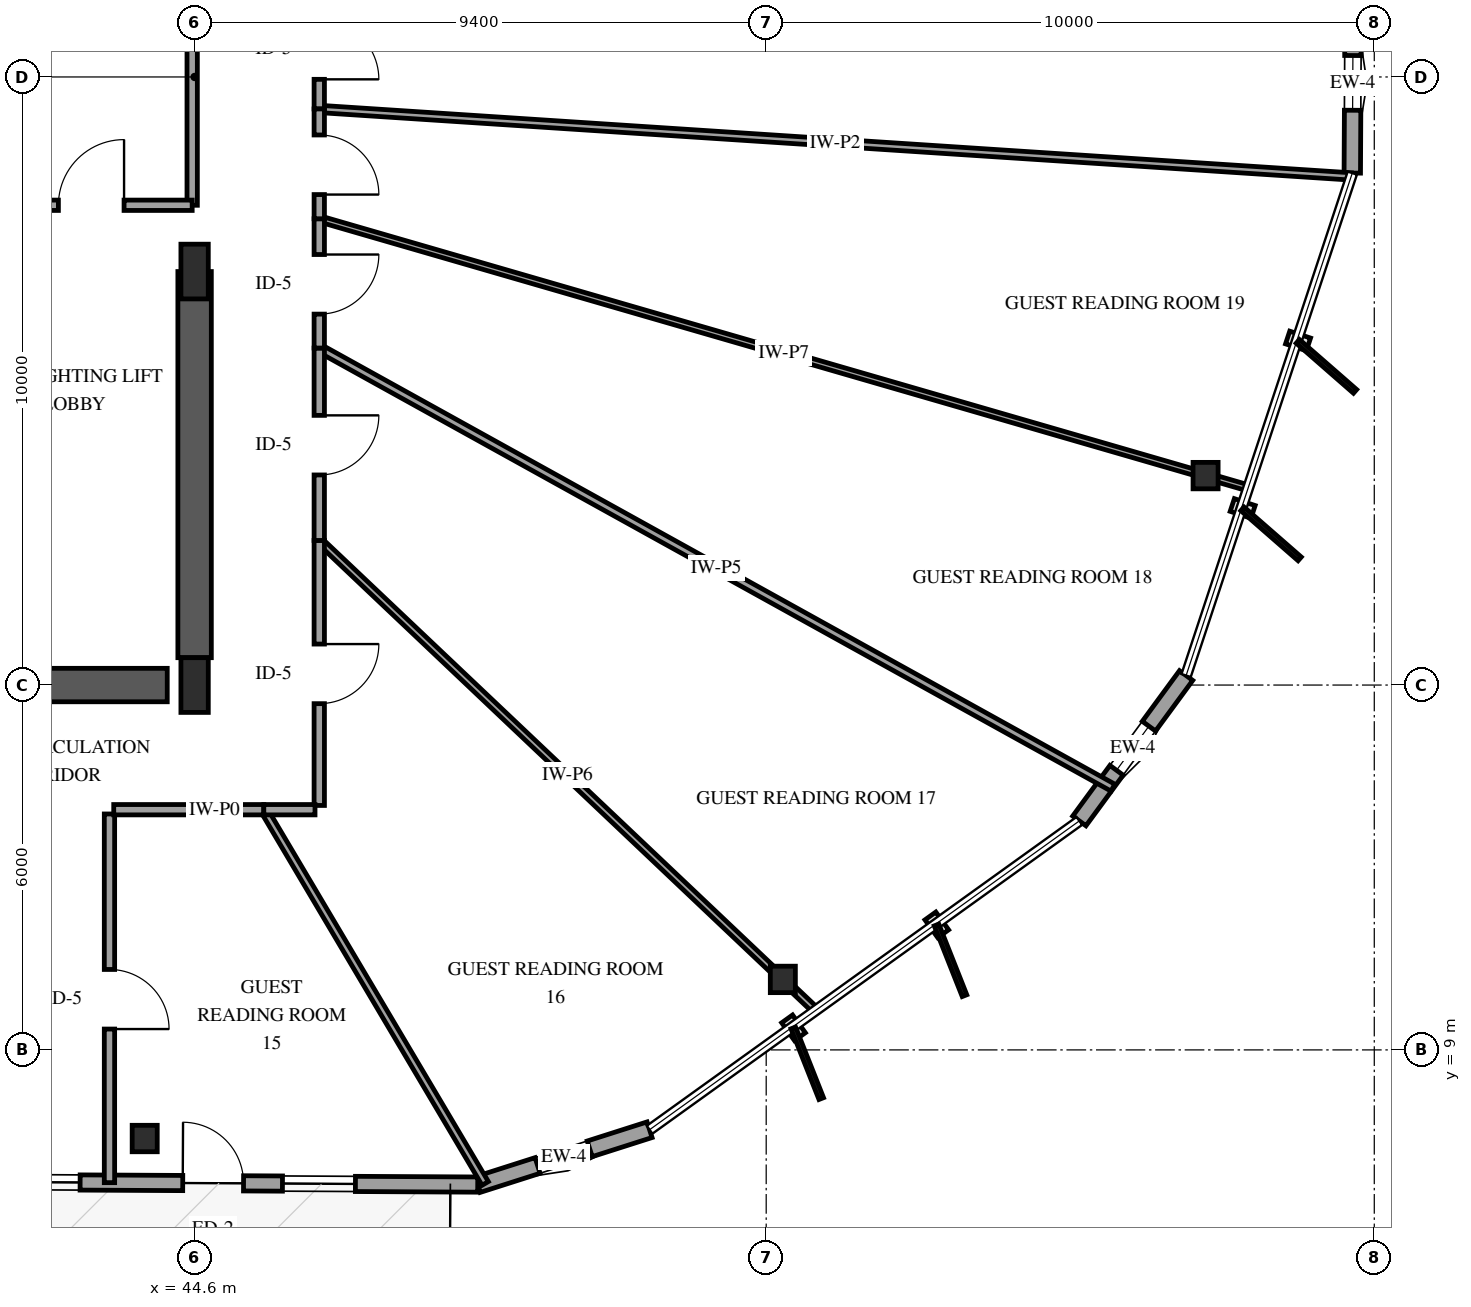
"""IFC4 building model, lengths in metres.
Left out: names, types, materials, properties, quantities, classifications, styles, units other than length and angle.
Written with IfcOpenShell. Run it as: python <this file> out.ifc"""

import sys

from ifc_helpers import new_model, si_unit, direction, frame, frame_2d, origin, origin_2d, place, context, subcontext, project, spatial, rectangle, i_section, extrude, element, fill, save


model = new_model("IFC4")
c1 = context("Model", 3, precision=1e-05, world=origin(), true_north=direction((0.0, 1.0)))
c2 = subcontext(c1, "Body", "Model", "MODEL_VIEW")
j1 = project(units=[si_unit("LENGTHUNIT", "METRE"), si_unit("PLANEANGLEUNIT", "RADIAN")], contexts=[c1])
p1 = place(None, origin())
s1 = spatial("IfcSite", under=j1, at=p1, CompositionType="ELEMENT")
p2 = place(p1, origin())
s2 = spatial("IfcBuilding", under=s1, at=p2, CompositionType="ELEMENT")
p3 = place(p2, frame((0.0, 0.0, 164.2)))
s3 = spatial("IfcBuildingStorey", under=s2, at=p3, CompositionType="ELEMENT", Elevation=164.2)
p4 = place(p3, frame((41.3, 15.0, 0.0), z_axis=(0.0, 0.0, 1.0), x_axis=(1.0, 0.0, 0.0)))
e1 = element("IfcWall", 1, at=p4, inside=s3, PredefinedType="SHEAR", context=c2, shape_type="SweptSolid", body=[
    extrude(rectangle(XDim=2.85, YDim=0.55, at=frame_2d((1.425, 0.0))), origin(), (0.0, 0.0, 1.0), 3.6),
])
p5 = place(p3, frame((44.6, 15.45, 0.0), z_axis=(0.0, 0.0, 1.0), x_axis=(0.0, 1.0, 0.0)))
e2 = element("IfcWall", 2, at=p5, inside=s3, PredefinedType="SHEAR", context=c2, shape_type="SweptSolid", body=[
    extrude(rectangle(XDim=6.35, YDim=0.55, at=frame_2d((3.175, 0.0))), origin(), (0.0, 0.0, 1.0), 3.6),
])
for number, where, z_axis, x_axis in (
    (3, (44.6, 15.0, 0.0), (0.0, 0.0, 1.0), (1.0, 0.0, 0.0)),
    (4, (44.6, 21.8, 0.0), (0.0, 0.0, 1.0), (1.0, 0.0, 0.0)),
):
    element("IfcColumn", number, at=place(p3, frame(where, z_axis=z_axis, x_axis=x_axis)), inside=s3, PredefinedType="PILASTER", context=c2, shape_type="SweptSolid", body=[
        extrude(rectangle(XDim=0.45, YDim=0.9, at=origin_2d()), origin(), (0.0, 0.0, 1.0), 3.6),
    ])
for number, where, z_axis, x_axis in (
    (5, (43.779, 7.542, 0.0), (0.0, 0.0, 1.0), (1.0, 0.0, 0.0)),
    (6, (54.274, 10.159, 0.0), (0.0, 0.0, 1.0), (1.0, 0.0, 0.0)),
    (7, (61.226, 18.444, 0.0), (0.0, 0.0, 1.0), (1.0, 0.0, 0.0)),
):
    element("IfcColumn", number, at=place(p3, frame(where, z_axis=z_axis, x_axis=x_axis)), inside=s3, PredefinedType="COLUMN", context=c2, shape_type="SweptSolid", body=[
        extrude(i_section(OverallWidth=0.412, OverallDepth=0.435, WebThickness=0.036, FlangeThickness=0.057, FilletRadius=0.038, at=origin_2d()), origin(), (0.0, 0.0, 1.0), 3.6),
    ])
p6 = place(p3, frame((49.256, 6.785, 0.0), z_axis=(0.0, 0.0, 1.0), x_axis=(0.95267036835, 0.304005212568, 0.0)))
e8 = element("IfcWall", 8, at=p6, inside=s3, PredefinedType="SOLIDWALL", context=c2, shape_type="SweptSolid", body=[
    extrude(rectangle(XDim=2.967, YDim=0.27, at=frame_2d((1.483, 0.0))), origin(), (0.0, 0.0, 1.0), 2.679),
])
p7 = place(p6, frame((1.033, 0.0, 0.75)))
e9 = element("IfcOpeningElement", 9, at=p7, cuts=e8, PredefinedType="OPENING", context=c2, shape_type="SweptSolid", body=[
    extrude(rectangle(XDim=0.9, YDim=1.5, at=frame_2d((0.45, 0.75))), frame((0.0, 0.145, 0.0), z_axis=(0.0, -1.0, 0.0), x_axis=(1.0, 0.0, 0.0)), (0.0, 0.0, 1.0), 0.29),
])
p8 = place(p3, frame((40.553, 6.831, 0.0), z_axis=(0.0, 0.0, 1.0), x_axis=(0.999986386637, -0.005217905737, 0.0)))
e10 = element("IfcWall", 10, at=p8, inside=s3, PredefinedType="SOLIDWALL", context=c2, shape_type="SweptSolid", body=[
    extrude(rectangle(XDim=8.703, YDim=0.25, at=frame_2d((4.351, 0.0))), origin(), (0.0, 0.0, 1.0), 2.679),
])
p9 = place(p8, frame((3.851, 0.0, 0.0)))
e11 = element("IfcOpeningElement", 11, at=p9, cuts=e10, PredefinedType="OPENING", context=c2, shape_type="SweptSolid", body=[
    extrude(rectangle(XDim=1.0, YDim=2.15, at=frame_2d((0.5, 1.075))), frame((0.0, 0.135, 0.0), z_axis=(0.0, -1.0, 0.0), x_axis=(1.0, 0.0, 0.0)), (0.0, 0.0, 1.0), 0.27),
])
p10 = place(p8, frame((0.964, 0.0, 0.72)))
e12 = element("IfcOpeningElement", 12, at=p10, cuts=e10, PredefinedType="OPENING", context=c2, shape_type="SweptSolid", body=[
    extrude(rectangle(XDim=1.2, YDim=1.6, at=frame_2d((0.6, 0.8))), frame((0.0, 0.135, 0.0), z_axis=(0.0, -1.0, 0.0), x_axis=(1.0, 0.0, 0.0)), (0.0, 0.0, 1.0), 0.27),
])
p11 = place(p8, frame((5.491, 0.0, 0.72)))
e13 = element("IfcOpeningElement", 13, at=p11, cuts=e10, PredefinedType="OPENING", context=c2, shape_type="SweptSolid", body=[
    extrude(rectangle(XDim=1.2, YDim=1.6, at=frame_2d((0.6, 0.8))), frame((0.0, 0.135, 0.0), z_axis=(0.0, -1.0, 0.0), x_axis=(1.0, 0.0, 0.0)), (0.0, 0.0, 1.0), 0.27),
])
p12 = place(p3, frame((59.149, 12.766, 0.0), z_axis=(0.0, 0.0, 1.0), x_axis=(0.592030622016, 0.805915468641, 0.0)))
e14 = element("IfcWall", 14, at=p12, inside=s3, PredefinedType="SOLIDWALL", context=c2, shape_type="SweptSolid", body=[
    extrude(rectangle(XDim=2.967, YDim=0.27, at=frame_2d((1.483, 0.0))), origin(), (0.0, 0.0, 1.0), 2.679),
])
p13 = place(p12, frame((1.033, 0.0, 0.75)))
e15 = element("IfcOpeningElement", 15, at=p13, cuts=e14, PredefinedType="OPENING", context=c2, shape_type="SweptSolid", body=[
    extrude(rectangle(XDim=0.9, YDim=1.5, at=frame_2d((0.45, 0.75))), frame((0.0, 0.145, 0.0), z_axis=(0.0, -1.0, 0.0), x_axis=(1.0, 0.0, 0.0)), (0.0, 0.0, 1.0), 0.29),
])
p14 = place(p3, frame((63.638, 23.419, 0.0), z_axis=(0.0, 0.0, 1.0), x_axis=(0.005267416636, 0.999986127065, 0.0)))
e16 = element("IfcWall", 16, at=p14, inside=s3, PredefinedType="SOLIDWALL", context=c2, shape_type="SweptSolid", body=[
    extrude(rectangle(XDim=2.966, YDim=0.27, at=frame_2d((1.483, 0.0))), origin(), (0.0, 0.0, 1.0), 2.679),
])
p15 = place(p14, frame((1.033, 0.0, 0.75)))
e17 = element("IfcOpeningElement", 17, at=p15, cuts=e16, PredefinedType="OPENING", context=c2, shape_type="SweptSolid", body=[
    extrude(rectangle(XDim=0.9, YDim=1.5, at=frame_2d((0.45, 0.75))), frame((0.0, 0.145, 0.0), z_axis=(0.0, -1.0, 0.0), x_axis=(1.0, 0.0, 0.0)), (0.0, 0.0, 1.0), 0.29),
])
p16 = place(p3, frame((63.62, 23.364, 0.0), z_axis=(0.0, 0.0, 1.0), x_axis=(-0.997867277943, 0.065275536078, 0.0)))
e18 = element("IfcWall", 18, at=p16, inside=s3, PredefinedType="PARTITIONING", context=c2, shape_type="SweptSolid", body=[
    extrude(rectangle(XDim=17.007, YDim=0.12, at=frame_2d((8.503, 0.0))), origin(), (0.0, 0.0, 1.0), 3.3),
])
p17 = place(p3, frame((46.65, 22.668, 0.0), z_axis=(0.0, 0.0, 1.0), x_axis=(0.960497233725, -0.278289532694, 0.0)))
e19 = element("IfcWall", 19, at=p17, inside=s3, PredefinedType="PARTITIONING", context=c2, shape_type="SweptSolid", body=[
    extrude(rectangle(XDim=15.904, YDim=0.1, at=frame_2d((7.952, 0.0))), origin(), (0.0, 0.0, 1.0), 3.3),
])
p18 = place(p3, frame((46.65, 20.542, 0.0), z_axis=(0.0, 0.0, 1.0), x_axis=(0.874785594424, -0.484510230839, 0.0)))
e20 = element("IfcWall", 20, at=p18, inside=s3, PredefinedType="PARTITIONING", context=c2, shape_type="SweptSolid", body=[
    extrude(rectangle(XDim=14.92, YDim=0.13, at=frame_2d((7.46, 0.0))), origin(), (0.0, 0.0, 1.0), 3.3),
])
p19 = place(p3, frame((46.65, 17.378, 0.0), z_axis=(0.0, 0.0, 1.0), x_axis=(0.726109041818, -0.687579565861, 0.0)))
e21 = element("IfcWall", 21, at=p19, inside=s3, PredefinedType="PARTITIONING", context=c2, shape_type="SweptSolid", body=[
    extrude(rectangle(XDim=11.241, YDim=0.11, at=frame_2d((5.621, 0.0))), origin(), (0.0, 0.0, 1.0), 2.595),
])
p20 = place(p3, frame((45.738, 12.95, 0.0), z_axis=(0.0, 0.0, 1.0), x_axis=(0.509677787301, -0.860365360258, 0.0)))
e22 = element("IfcWall", 22, at=p20, inside=s3, PredefinedType="PARTITIONING", context=c2, shape_type="SweptSolid", body=[
    extrude(rectangle(XDim=7.144, YDim=0.12, at=frame_2d((3.572, 0.0))), origin(), (0.0, 0.0, 1.0), 2.678),
])
p21 = place(p3, frame((44.56, 29.8, 0.0), z_axis=(0.0, 0.0, 1.0), x_axis=(0.0, -1.0, 0.0)))
e23 = element("IfcWall", 23, at=p21, inside=s3, PredefinedType="PARTITIONING", context=c2, shape_type="SweptSolid", body=[
    extrude(rectangle(XDim=6.91, YDim=0.17, at=frame_2d((3.455, 0.0))), origin(), (0.0, 0.0, 1.0), 2.34),
])
p22 = place(p21, frame((2.915, 0.0, 0.0)))
e24 = element("IfcOpeningElement", 24, at=p22, cuts=e23, PredefinedType="OPENING", context=c2, shape_type="SweptSolid", body=[
    extrude(rectangle(XDim=1.08, YDim=2.15, at=frame_2d((0.54, 1.075))), frame((0.0, 0.095, 0.0), z_axis=(0.0, -1.0, 0.0), x_axis=(1.0, 0.0, 0.0)), (0.0, 0.0, 1.0), 0.19),
])
p23 = place(p3, frame((43.2, 12.88, 0.0), z_axis=(0.0, 0.0, 1.0), x_axis=(0.0, -1.0, 0.0)))
e25 = element("IfcWall", 25, at=p23, inside=s3, PredefinedType="PARTITIONING", context=c2, shape_type="SweptSolid", body=[
    extrude(rectangle(XDim=6.063, YDim=0.17, at=frame_2d((3.031, 0.0))), origin(), (0.0, 0.0, 1.0), 2.595),
])
p24 = place(p23, frame((2.557, 0.0, 0.0)))
e26 = element("IfcOpeningElement", 26, at=p24, cuts=e25, PredefinedType="OPENING", context=c2, shape_type="SweptSolid", body=[
    extrude(rectangle(XDim=0.98, YDim=2.15, at=frame_2d((0.49, 1.075))), frame((0.0, 0.095, 0.0), z_axis=(0.0, -1.0, 0.0), x_axis=(1.0, 0.0, 0.0)), (0.0, 0.0, 1.0), 0.19),
])
p25 = place(p3, frame((46.65, 17.378, 0.0), z_axis=(0.0, 0.0, 1.0), x_axis=(0.0, -1.0, 0.0)))
e27 = element("IfcWall", 27, at=p25, inside=s3, PredefinedType="PARTITIONING", context=c2, shape_type="SweptSolid", body=[
    extrude(rectangle(XDim=4.358, YDim=0.17, at=frame_2d((2.179, 0.0))), origin(), (0.0, 0.0, 1.0), 3.3),
])
p26 = place(p25, frame((1.704, 0.0, 0.0)))
e28 = element("IfcOpeningElement", 28, at=p26, cuts=e27, PredefinedType="OPENING", context=c2, shape_type="SweptSolid", body=[
    extrude(rectangle(XDim=0.98, YDim=2.15, at=frame_2d((0.49, 1.075))), frame((0.0, 0.095, 0.0), z_axis=(0.0, -1.0, 0.0), x_axis=(1.0, 0.0, 0.0)), (0.0, 0.0, 1.0), 0.19),
])
p27 = place(p3, frame((41.24, 22.89, 0.0), z_axis=(0.0, 0.0, 1.0), x_axis=(1.0, 0.0, 0.0)))
e29 = element("IfcWall", 29, at=p27, inside=s3, PredefinedType="PARTITIONING", context=c2, shape_type="SweptSolid", body=[
    extrude(rectangle(XDim=3.32, YDim=0.17, at=frame_2d((1.66, 0.0))), origin(), (0.0, 0.0, 1.0), 3.3),
])
p28 = place(p27, frame((1.12, 0.0, 0.0)))
e30 = element("IfcOpeningElement", 30, at=p28, cuts=e29, PredefinedType="OPENING", context=c2, shape_type="SweptSolid", body=[
    extrude(rectangle(XDim=1.08, YDim=2.15, at=frame_2d((0.54, 1.075))), frame((0.0, 0.095, 0.0), z_axis=(0.0, -1.0, 0.0), x_axis=(1.0, 0.0, 0.0)), (0.0, 0.0, 1.0), 0.19),
])
p29 = place(p3, frame((46.65, 20.542, 0.0), z_axis=(0.0, 0.0, 1.0), x_axis=(0.0, -1.0, 0.0)))
e31 = element("IfcWall", 31, at=p29, inside=s3, PredefinedType="PARTITIONING", context=c2, shape_type="SweptSolid", body=[
    extrude(rectangle(XDim=3.164, YDim=0.17, at=frame_2d((1.582, 0.0))), origin(), (0.0, 0.0, 1.0), 3.3),
])
p30 = place(p29, frame((1.107, 0.0, 0.0)))
e32 = element("IfcOpeningElement", 32, at=p30, cuts=e31, PredefinedType="OPENING", context=c2, shape_type="SweptSolid", body=[
    extrude(rectangle(XDim=0.98, YDim=2.15, at=frame_2d((0.49, 1.075))), frame((0.0, 0.095, 0.0), z_axis=(0.0, -1.0, 0.0), x_axis=(1.0, 0.0, 0.0)), (0.0, 0.0, 1.0), 0.19),
])
p31 = place(p3, frame((45.738, 12.95, 0.0), z_axis=(0.0, 0.0, 1.0), x_axis=(-1.0, 0.0, 0.0)))
e33 = element("IfcWall", 33, at=p31, inside=s3, PredefinedType="PARTITIONING", context=c2, shape_type="SweptSolid", body=[
    extrude(rectangle(XDim=2.468, YDim=0.17, at=frame_2d((1.234, 0.0))), origin(), (0.0, 0.0, 1.0), 3.3),
])
p32 = place(p3, frame((46.65, 22.668, 0.0), z_axis=(0.0, 0.0, 1.0), x_axis=(0.0, -1.0, 0.0)))
e34 = element("IfcWall", 34, at=p32, inside=s3, PredefinedType="PARTITIONING", context=c2, shape_type="SweptSolid", body=[
    extrude(rectangle(XDim=2.126, YDim=0.17, at=frame_2d((1.063, 0.0))), origin(), (0.0, 0.0, 1.0), 3.3),
])
p33 = place(p32, frame((0.588, 0.0, 0.0)))
e35 = element("IfcOpeningElement", 35, at=p33, cuts=e34, PredefinedType="OPENING", context=c2, shape_type="SweptSolid", body=[
    extrude(rectangle(XDim=0.98, YDim=2.15, at=frame_2d((0.49, 1.075))), frame((0.0, 0.095, 0.0), z_axis=(0.0, -1.0, 0.0), x_axis=(1.0, 0.0, 0.0)), (0.0, 0.0, 1.0), 0.19),
])
p34 = place(p3, frame((46.65, 26.458, 0.0), z_axis=(0.0, 0.0, 1.0), x_axis=(0.0, -1.0, 0.0)))
e36 = element("IfcWall", 36, at=p34, inside=s3, PredefinedType="PARTITIONING", context=c2, shape_type="SweptSolid", body=[
    extrude(rectangle(XDim=1.984, YDim=0.17, at=frame_2d((0.992, 0.0))), origin(), (0.0, 0.0, 1.0), 3.3),
])
p35 = place(p34, frame((0.517, 0.0, 0.0)))
e37 = element("IfcOpeningElement", 37, at=p35, cuts=e36, PredefinedType="OPENING", context=c2, shape_type="SweptSolid", body=[
    extrude(rectangle(XDim=0.98, YDim=2.15, at=frame_2d((0.49, 1.075))), frame((0.0, 0.095, 0.0), z_axis=(0.0, -1.0, 0.0), x_axis=(1.0, 0.0, 0.0)), (0.0, 0.0, 1.0), 0.19),
])
p36 = place(p3, frame((46.65, 24.474, 0.0), z_axis=(0.0, 0.0, 1.0), x_axis=(0.0, -1.0, 0.0)))
e38 = element("IfcWall", 38, at=p36, inside=s3, PredefinedType="PARTITIONING", context=c2, shape_type="SweptSolid", body=[
    extrude(rectangle(XDim=1.806, YDim=0.17, at=frame_2d((0.903, 0.0))), origin(), (0.0, 0.0, 1.0), 3.3),
])
p37 = place(p36, frame((0.428, 0.0, 0.0)))
e39 = element("IfcOpeningElement", 39, at=p37, cuts=e38, PredefinedType="OPENING", context=c2, shape_type="SweptSolid", body=[
    extrude(rectangle(XDim=0.98, YDim=2.15, at=frame_2d((0.49, 1.075))), frame((0.0, 0.095, 0.0), z_axis=(0.0, -1.0, 0.0), x_axis=(1.0, 0.0, 0.0)), (0.0, 0.0, 1.0), 0.19),
])
p38 = place(p3, frame((46.58, 12.95, 0.0), z_axis=(0.0, 0.0, 1.0), x_axis=(-1.0, 0.0, 0.0)))
e40 = element("IfcWall", 40, at=p38, inside=s3, PredefinedType="PARTITIONING", context=c2, shape_type="SweptSolid", body=[
    extrude(rectangle(XDim=0.842, YDim=0.17, at=frame_2d((0.421, 0.0))), origin(), (0.0, 0.0, 1.0), 3.3),
])
p39 = place(p7, origin())
e41 = element("IfcWindow", 41, at=p39, inside=s3, PartitioningType="SINGLE_PANEL", PredefinedType="WINDOW", context=c2, shape_type="SweptSolid", body=[
    extrude(rectangle(XDim=0.9, YDim=1.5, at=frame_2d((0.45, 0.75))), frame((0.0, 0.03, 0.0), z_axis=(0.0, -1.0, 0.0), x_axis=(1.0, 0.0, 0.0)), (0.0, 0.0, 1.0), 0.06),
])
fill(e9, e41)
p40 = place(p9, origin())
e42 = element("IfcDoor", 42, at=p40, inside=s3, OperationType="SINGLE_SWING_LEFT", PredefinedType="DOOR", context=c2, shape_type="SweptSolid", body=[
    extrude(rectangle(XDim=1.0, YDim=2.15, at=frame_2d((0.5, 1.075))), frame((0.0, 0.025, 0.0), z_axis=(0.0, -1.0, 0.0), x_axis=(1.0, 0.0, 0.0)), (0.0, 0.0, 1.0), 0.05),
])
fill(e11, e42)
p41 = place(p10, origin())
e43 = element("IfcWindow", 43, at=p41, inside=s3, PartitioningType="SINGLE_PANEL", PredefinedType="WINDOW", context=c2, shape_type="SweptSolid", body=[
    extrude(rectangle(XDim=1.2, YDim=1.6, at=frame_2d((0.6, 0.8))), frame((0.0, 0.03, 0.0), z_axis=(0.0, -1.0, 0.0), x_axis=(1.0, 0.0, 0.0)), (0.0, 0.0, 1.0), 0.06),
])
fill(e12, e43)
p42 = place(p11, origin())
e44 = element("IfcWindow", 44, at=p42, inside=s3, PartitioningType="SINGLE_PANEL", PredefinedType="WINDOW", context=c2, shape_type="SweptSolid", body=[
    extrude(rectangle(XDim=1.2, YDim=1.6, at=frame_2d((0.6, 0.8))), frame((0.0, 0.03, 0.0), z_axis=(0.0, -1.0, 0.0), x_axis=(1.0, 0.0, 0.0)), (0.0, 0.0, 1.0), 0.06),
])
fill(e13, e44)
p43 = place(p13, origin())
e45 = element("IfcWindow", 45, at=p43, inside=s3, PartitioningType="SINGLE_PANEL", PredefinedType="WINDOW", context=c2, shape_type="SweptSolid", body=[
    extrude(rectangle(XDim=0.9, YDim=1.5, at=frame_2d((0.45, 0.75))), frame((0.0, 0.03, 0.0), z_axis=(0.0, -1.0, 0.0), x_axis=(1.0, 0.0, 0.0)), (0.0, 0.0, 1.0), 0.06),
])
fill(e15, e45)
p44 = place(p15, origin())
e46 = element("IfcWindow", 46, at=p44, inside=s3, PartitioningType="SINGLE_PANEL", PredefinedType="WINDOW", context=c2, shape_type="SweptSolid", body=[
    extrude(rectangle(XDim=0.9, YDim=1.5, at=frame_2d((0.45, 0.75))), frame((0.0, 0.03, 0.0), z_axis=(0.0, -1.0, 0.0), x_axis=(1.0, 0.0, 0.0)), (0.0, 0.0, 1.0), 0.06),
])
fill(e17, e46)
p45 = place(p24, origin())
e47 = element("IfcDoor", 47, at=p45, inside=s3, OperationType="SINGLE_SWING_RIGHT", PredefinedType="DOOR", context=c2, shape_type="SweptSolid", body=[
    extrude(rectangle(XDim=0.98, YDim=2.15, at=frame_2d((0.49, 1.075))), frame((0.0, 0.025, 0.0), z_axis=(0.0, -1.0, 0.0), x_axis=(1.0, 0.0, 0.0)), (0.0, 0.0, 1.0), 0.05),
])
fill(e26, e47)
p46 = place(p26, origin())
e48 = element("IfcDoor", 48, at=p46, inside=s3, OperationType="SINGLE_SWING_LEFT", PredefinedType="DOOR", context=c2, shape_type="SweptSolid", body=[
    extrude(rectangle(XDim=0.98, YDim=2.15, at=frame_2d((0.49, 1.075))), frame((0.0, 0.025, 0.0), z_axis=(0.0, -1.0, 0.0), x_axis=(1.0, 0.0, 0.0)), (0.0, 0.0, 1.0), 0.05),
])
fill(e28, e48)
p47 = place(p28, origin())
e49 = element("IfcDoor", 49, at=p47, inside=s3, OperationType="SINGLE_SWING_RIGHT", PredefinedType="DOOR", context=c2, shape_type="SweptSolid", body=[
    extrude(rectangle(XDim=1.08, YDim=2.15, at=frame_2d((0.54, 1.075))), frame((0.0, 0.025, 0.0), z_axis=(0.0, -1.0, 0.0), x_axis=(1.0, 0.0, 0.0)), (0.0, 0.0, 1.0), 0.05),
])
fill(e30, e49)
p48 = place(p30, origin())
e50 = element("IfcDoor", 50, at=p48, inside=s3, OperationType="SINGLE_SWING_LEFT", PredefinedType="DOOR", context=c2, shape_type="SweptSolid", body=[
    extrude(rectangle(XDim=0.98, YDim=2.15, at=frame_2d((0.49, 1.075))), frame((0.0, 0.025, 0.0), z_axis=(0.0, -1.0, 0.0), x_axis=(1.0, 0.0, 0.0)), (0.0, 0.0, 1.0), 0.05),
])
fill(e32, e50)
p49 = place(p33, origin())
e51 = element("IfcDoor", 51, at=p49, inside=s3, OperationType="SINGLE_SWING_LEFT", PredefinedType="DOOR", context=c2, shape_type="SweptSolid", body=[
    extrude(rectangle(XDim=0.98, YDim=2.15, at=frame_2d((0.49, 1.075))), frame((0.0, 0.025, 0.0), z_axis=(0.0, -1.0, 0.0), x_axis=(1.0, 0.0, 0.0)), (0.0, 0.0, 1.0), 0.05),
])
fill(e35, e51)
p50 = place(p35, origin())
e52 = element("IfcDoor", 52, at=p50, inside=s3, OperationType="SINGLE_SWING_RIGHT", PredefinedType="DOOR", context=c2, shape_type="SweptSolid", body=[
    extrude(rectangle(XDim=0.98, YDim=2.15, at=frame_2d((0.49, 1.075))), frame((0.0, 0.025, 0.0), z_axis=(0.0, -1.0, 0.0), x_axis=(1.0, 0.0, 0.0)), (0.0, 0.0, 1.0), 0.05),
])
fill(e37, e52)
p51 = place(p37, origin())
e53 = element("IfcDoor", 53, at=p51, inside=s3, OperationType="SINGLE_SWING_RIGHT", PredefinedType="DOOR", context=c2, shape_type="SweptSolid", body=[
    extrude(rectangle(XDim=0.98, YDim=2.15, at=frame_2d((0.49, 1.075))), frame((0.0, 0.025, 0.0), z_axis=(0.0, -1.0, 0.0), x_axis=(1.0, 0.0, 0.0)), (0.0, 0.0, 1.0), 0.05),
])
fill(e39, e53)
save(model, sys.argv[1])
